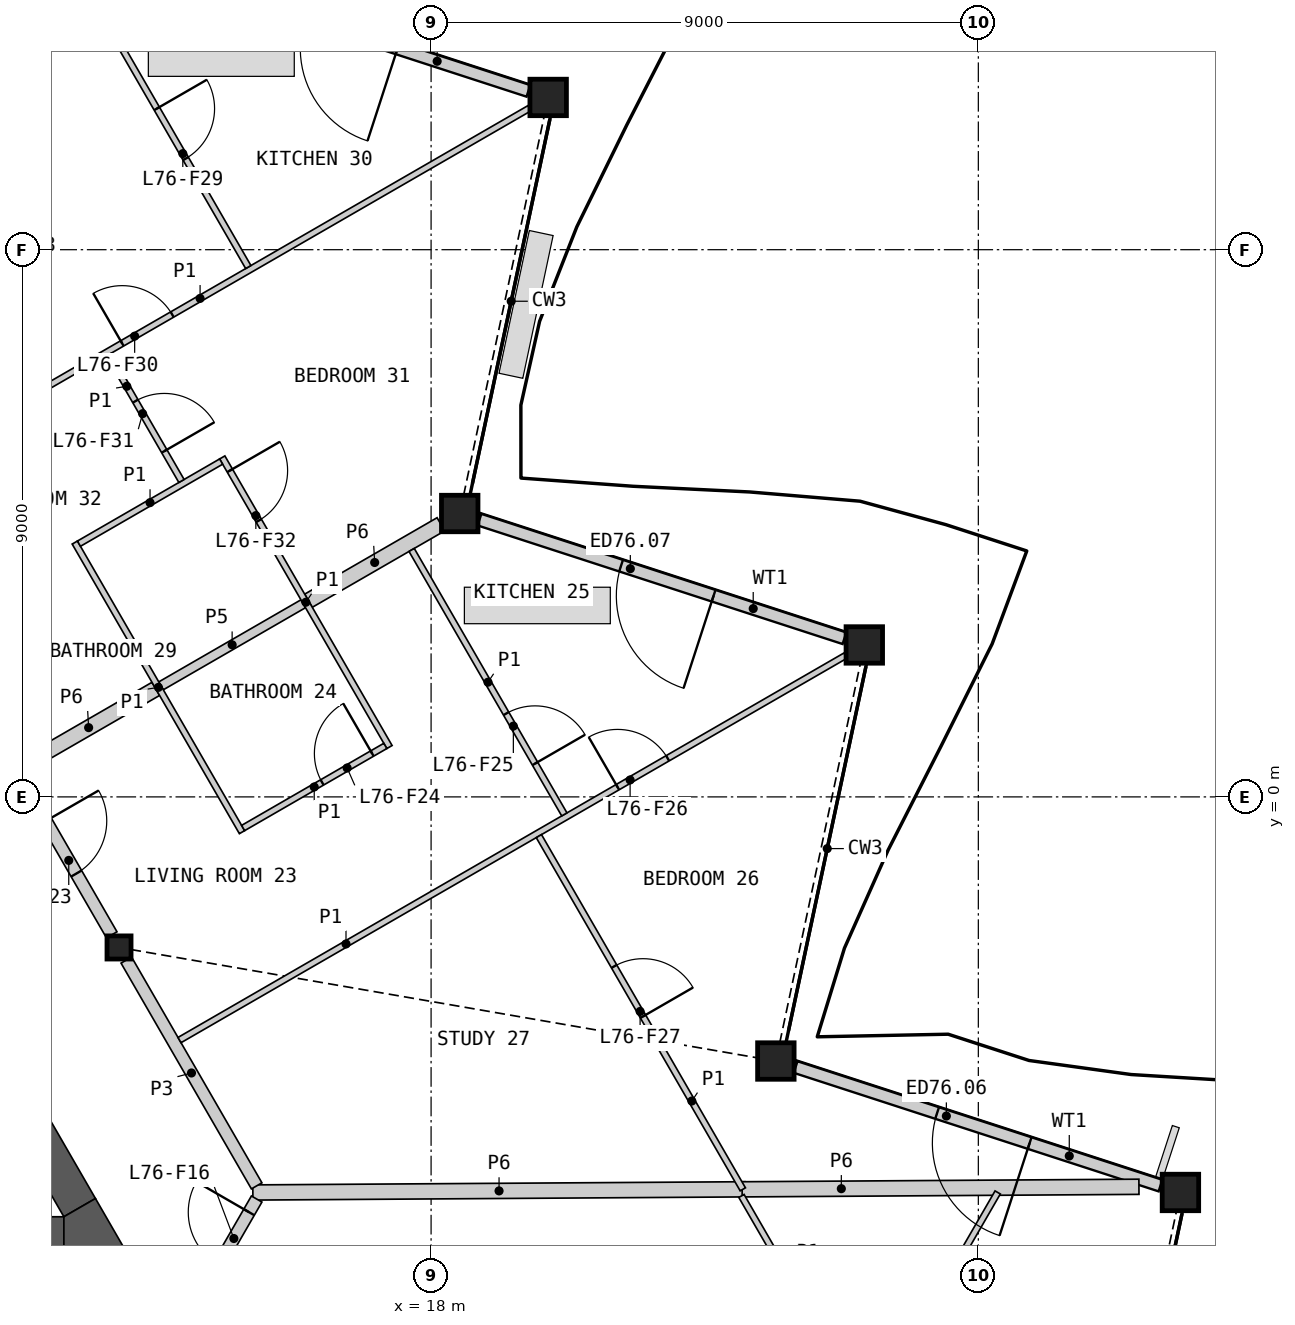
"""IFC4 building model, lengths in metres.
Left out: names, types, materials, properties, quantities, classifications, styles, units other than length and angle.
Written with IfcOpenShell. Run it as: python <this file> out.ifc"""

import sys

from ifc_helpers import new_model, si_unit, direction, frame, frame_2d, origin, origin_2d, place, context, subcontext, project, spatial, polyline, rectangle, hollow_rectangle, i_section, outline, extrude, element, fill, save


model = new_model("IFC4")
c1 = context("Model", 3, precision=1e-05, world=origin(), true_north=direction((0.0, 1.0)))
c2 = subcontext(c1, "Body", "Model", "MODEL_VIEW")
j1 = project(units=[si_unit("LENGTHUNIT", "METRE"), si_unit("PLANEANGLEUNIT", "RADIAN")], contexts=[c1])
p1 = place(None, origin())
s1 = spatial("IfcSite", under=j1, at=p1, CompositionType="ELEMENT")
p2 = place(p1, origin())
s2 = spatial("IfcBuilding", under=s1, at=p2, CompositionType="ELEMENT")
p3 = place(p2, frame((0.0, 0.0, 339.2)))
s3 = spatial("IfcBuildingStorey", under=s2, at=p3, CompositionType="ELEMENT", Elevation=339.2)
for number, where, z_axis, x_axis in (
    (1, (30.324, -6.506, 0.0), (0.0, 0.0, 1.0), (1.0, 0.0, 0.0)),
    (2, (23.67, -4.344, 0.0), (0.0, 0.0, 1.0), (1.0, 0.0, 0.0)),
    (3, (25.125, 2.499, 0.0), (0.0, 0.0, 1.0), (1.0, 0.0, 0.0)),
    (4, (18.471, 4.661, 0.0), (0.0, 0.0, 1.0), (1.0, 0.0, 0.0)),
    (5, (19.926, 11.504, 0.0), (0.0, 0.0, 1.0), (1.0, 0.0, 0.0)),
):
    element("IfcColumn", number, at=place(p3, frame(where, z_axis=z_axis, x_axis=x_axis)), inside=s3, PredefinedType="COLUMN", context=c2, shape_type="SweptSolid", body=[
        extrude(hollow_rectangle(XDim=0.6, YDim=0.6, WallThickness=0.04, at=origin_2d()), origin(), (0.0, 0.0, 1.0), 3.4),
    ])
p4 = place(p3, frame((12.868, -2.476, 0.0), z_axis=(0.0, 0.0, 1.0), x_axis=(1.0, 0.0, 0.0)))
e6 = element("IfcColumn", 6, at=p4, inside=s3, PredefinedType="COLUMN", context=c2, shape_type="SweptSolid", body=[
    extrude(i_section(OverallWidth=0.396, OverallDepth=0.381, WebThickness=0.019, FlangeThickness=0.03, at=origin_2d()), origin(), (0.0, 0.0, 1.0), 3.4),
])
p5 = place(p3, frame((29.996, -6.393, 0.0), z_axis=(0.0, 0.0, 1.0), x_axis=(-0.951051127664, 0.309033578383, 0.0)))
e7 = element("IfcWall", 7, at=p5, inside=s3, PredefinedType="SOLIDWALL", context=c2, shape_type="SweptSolid", body=[
    extrude(rectangle(XDim=6.31, YDim=0.2, at=frame_2d((3.155, 0.0))), origin(), (0.0, 0.0, 1.0), 2.488),
])
p6 = place(p5, frame((2.263, 0.0, 0.0)))
e8 = element("IfcOpeningElement", 8, at=p6, cuts=e7, PredefinedType="OPENING", context=c2, shape_type="SweptSolid", body=[
    extrude(rectangle(XDim=1.6, YDim=2.25, at=frame_2d((0.8, 1.125))), frame((0.0, 0.11, 0.0), z_axis=(0.0, -1.0, 0.0), x_axis=(1.0, 0.0, 0.0)), (0.0, 0.0, 1.0), 0.22),
])
p7 = place(p3, frame((24.798, 2.609, 0.0), z_axis=(0.0, 0.0, 1.0), x_axis=(-0.951065616977, 0.308988983952, 0.0)))
e9 = element("IfcWall", 9, at=p7, inside=s3, PredefinedType="SOLIDWALL", context=c2, shape_type="SweptSolid", body=[
    extrude(rectangle(XDim=6.312, YDim=0.2, at=frame_2d((3.156, 0.0))), origin(), (0.0, 0.0, 1.0), 2.488),
])
p8 = place(p7, frame((2.263, 0.0, 0.0)))
e10 = element("IfcOpeningElement", 10, at=p8, cuts=e9, PredefinedType="OPENING", context=c2, shape_type="SweptSolid", body=[
    extrude(rectangle(XDim=1.6, YDim=2.25, at=frame_2d((0.8, 1.125))), frame((0.0, 0.11, 0.0), z_axis=(0.0, -1.0, 0.0), x_axis=(1.0, 0.0, 0.0)), (0.0, 0.0, 1.0), 0.22),
])
p9 = place(p3, frame((19.601, 11.612, 0.0), z_axis=(0.0, 0.0, 1.0), x_axis=(-0.951065041052, 0.308990756638, 0.0)))
e11 = element("IfcWall", 11, at=p9, inside=s3, PredefinedType="SOLIDWALL", context=c2, shape_type="SweptSolid", body=[
    extrude(rectangle(XDim=6.313, YDim=0.2, at=frame_2d((3.156, 0.0))), origin(), (0.0, 0.0, 1.0), 2.488),
])
p10 = place(p9, frame((2.263, 0.0, 0.0)))
e12 = element("IfcOpeningElement", 12, at=p10, cuts=e11, PredefinedType="OPENING", context=c2, shape_type="SweptSolid", body=[
    extrude(rectangle(XDim=1.6, YDim=2.25, at=frame_2d((0.8, 1.125))), frame((0.0, 0.11, 0.0), z_axis=(0.0, -1.0, 0.0), x_axis=(1.0, 0.0, 0.0)), (0.0, 0.0, 1.0), 0.22),
])
p11 = place(p3, frame((-11.961, -7.206, 0.0), z_axis=(0.0, 0.0, 1.0), x_axis=(1.0, 0.0, 0.0)))
e13 = element("IfcWall", 13, at=p11, inside=s3, PredefinedType="SHEAR", context=c2, shape_type="SweptSolid", body=[
    extrude(rectangle(XDim=23.921, YDim=0.6, at=frame_2d((11.961, 0.0))), origin(), (0.0, 0.0, 1.0), 3.1),
])
p12 = place(p3, frame((12.221, -6.756, 0.0), z_axis=(0.0, 0.0, 1.0), x_axis=(-0.50000604952, 0.866021911064, 0.0)))
e14 = element("IfcWall", 14, at=p12, inside=s3, PredefinedType="SHEAR", context=c2, shape_type="SweptSolid", body=[
    extrude(rectangle(XDim=4.869, YDim=0.6, at=frame_2d((2.434, 0.0))), origin(), (0.0, 0.0, 1.0), 3.1),
])
p13 = place(p3, origin())
e15 = element("IfcWall", 15, at=p13, inside=s3, PredefinedType="SHEAR", context=c2, shape_type="SweptSolid", body=[
    extrude(outline(polyline([(11.961, -7.506), (11.961, -6.906), (12.48, -6.606), (13.0, -7.506), (11.961, -7.506)])), origin(), (0.0, 0.0, 1.0), 3.1),
])
p14 = place(p3, frame((8.698, 4.745, 0.0), z_axis=(0.0, 0.0, 1.0), x_axis=(0.499984266882, -0.866034487114, 0.0)))
e16 = element("IfcWall", 16, at=p14, inside=s3, PredefinedType="PARTITIONING", context=c2, shape_type="SweptSolid", body=[
    extrude(rectangle(XDim=8.099, YDim=0.2, at=frame_2d((4.049, 0.0))), origin(), (0.0, 0.0, 1.0), 3.1),
])
p15 = place(p14, frame((5.935, 0.0, 0.0)))
e17 = element("IfcOpeningElement", 17, at=p15, cuts=e16, PredefinedType="OPENING", context=c2, shape_type="SweptSolid", body=[
    extrude(rectangle(XDim=1.0, YDim=2.1, at=frame_2d((0.5, 1.05))), frame((0.0, 0.11, 0.0), z_axis=(0.0, -1.0, 0.0), x_axis=(1.0, 0.0, 0.0)), (0.0, 0.0, 1.0), 0.22),
])
p16 = place(p3, frame((6.066, 9.504, 0.0), z_axis=(0.0, 0.0, 1.0), x_axis=(0.866021168401, 0.500007335828, 0.0)))
e18 = element("IfcWall", 18, at=p16, inside=s3, PredefinedType="PARTITIONING", context=c2, shape_type="SweptSolid", body=[
    extrude(rectangle(XDim=7.962, YDim=0.25, at=frame_2d((3.981, 0.0))), origin(), (0.0, 0.0, 1.0), 2.33),
])
p17 = place(p3, frame((15.069, -6.506, 0.0), z_axis=(0.0, 0.0, 1.0), x_axis=(0.999979186485, 0.006451867641, 0.0)))
e19 = element("IfcWall", 19, at=p17, inside=s3, PredefinedType="PARTITIONING", context=c2, shape_type="SweptSolid", body=[
    extrude(rectangle(XDim=8.098, YDim=0.25, at=frame_2d((4.049, 0.0))), origin(), (0.0, 0.0, 1.0), 2.33),
])
p18 = place(p3, frame((23.115, -6.455, 0.0), z_axis=(0.0, 0.0, 1.0), x_axis=(0.999979299397, 0.006434343627, 0.0)))
e20 = element("IfcWall", 20, at=p18, inside=s3, PredefinedType="PARTITIONING", context=c2, shape_type="SweptSolid", body=[
    extrude(rectangle(XDim=6.526, YDim=0.25, at=frame_2d((3.263, 0.0))), origin(), (0.0, 0.0, 1.0), 2.33),
])
p19 = place(p3, frame((12.988, -2.684, 0.0), z_axis=(0.0, 0.0, 1.0), x_axis=(0.500003406062, -0.866023437285, 0.0)))
e21 = element("IfcWall", 21, at=p19, inside=s3, PredefinedType="PARTITIONING", context=c2, shape_type="SweptSolid", body=[
    extrude(rectangle(XDim=4.288, YDim=0.2, at=frame_2d((2.144, 0.0))), origin(), (0.0, 0.0, 1.0), 3.1),
])
p20 = place(p3, frame((13.293, -9.797, 0.0), z_axis=(0.0, 0.0, 1.0), x_axis=(0.499967746641, 0.866044024469, 0.0)))
e22 = element("IfcWall", 22, at=p20, inside=s3, PredefinedType="PARTITIONING", context=c2, shape_type="SweptSolid", body=[
    extrude(rectangle(XDim=3.676, YDim=0.2, at=frame_2d((1.838, 0.0))), origin(), (0.0, 0.0, 1.0), 3.1),
])
p21 = place(p20, frame((2.426, 0.0, 0.0)))
e23 = element("IfcOpeningElement", 23, at=p21, cuts=e22, PredefinedType="OPENING", context=c2, shape_type="SweptSolid", body=[
    extrude(rectangle(XDim=1.0, YDim=2.1, at=frame_2d((0.5, 1.05))), frame((0.0, 0.11, 0.0), z_axis=(0.0, -1.0, 0.0), x_axis=(1.0, 0.0, 0.0)), (0.0, 0.0, 1.0), 0.22),
])
p22 = place(p3, frame((11.264, 0.502, 0.0), z_axis=(0.0, 0.0, 1.0), x_axis=(0.866030925526, 0.499990435942, 0.0)))
e24 = element("IfcWall", 24, at=p22, inside=s3, PredefinedType="PARTITIONING", context=c2, shape_type="SweptSolid", body=[
    extrude(rectangle(XDim=2.55, YDim=0.25, at=frame_2d((1.275, 0.0))), origin(), (0.0, 0.0, 1.0), 2.33),
])
p23 = place(p3, frame((15.984, 3.227, 0.0), z_axis=(0.0, 0.0, 1.0), x_axis=(0.8660174017, 0.500013859761, 0.0)))
e25 = element("IfcWall", 25, at=p23, inside=s3, PredefinedType="PARTITIONING", context=c2, shape_type="SweptSolid", body=[
    extrude(rectangle(XDim=2.514, YDim=0.25, at=frame_2d((1.257, 0.0))), origin(), (0.0, 0.0, 1.0), 2.33),
])
p24 = place(p3, frame((13.559, 1.827, 0.0), z_axis=(0.0, 0.0, 1.0), x_axis=(0.866059108428, 0.4999416173, 0.0)))
e26 = element("IfcWall", 26, at=p24, inside=s3, PredefinedType="PLUMBINGWALL", context=c2, shape_type="SweptSolid", body=[
    extrude(rectangle(XDim=2.7, YDim=0.15, at=frame_2d((1.35, 0.0))), origin(), (0.0, 0.0, 1.0), 2.33),
])
p25 = place(p3, frame((13.863, -4.0, 0.0), z_axis=(0.0, 0.0, 1.0), x_axis=(0.866033203648, 0.499986489997, 0.0)))
e27 = element("IfcWall", 27, at=p25, inside=s3, PredefinedType="PARTITIONING", context=c2, shape_type="SweptSolid", body=[
    extrude(rectangle(XDim=12.646, YDim=0.1, at=frame_2d((6.323, 0.0))), origin(), (0.0, 0.0, 1.0), 2.33),
])
p26 = place(p25, frame((8.319, 0.0, 0.0)))
e28 = element("IfcOpeningElement", 28, at=p26, cuts=e27, PredefinedType="OPENING", context=c2, shape_type="SweptSolid", body=[
    extrude(rectangle(XDim=0.95, YDim=2.1, at=frame_2d((0.475, 1.05))), frame((0.0, 0.06, 0.0), z_axis=(0.0, -1.0, 0.0), x_axis=(1.0, 0.0, 0.0)), (0.0, 0.0, 1.0), 0.12),
])
p27 = place(p3, frame((8.786, 5.073, 0.0), z_axis=(0.0, 0.0, 1.0), x_axis=(0.86602139559, 0.500006942333, 0.0)))
e29 = element("IfcWall", 29, at=p27, inside=s3, PredefinedType="PARTITIONING", context=c2, shape_type="SweptSolid", body=[
    extrude(rectangle(XDim=12.505, YDim=0.1, at=frame_2d((6.252, 0.0))), origin(), (0.0, 0.0, 1.0), 2.33),
])
p28 = place(p27, frame((4.772, 0.0, 0.0)))
e30 = element("IfcOpeningElement", 30, at=p28, cuts=e29, PredefinedType="OPENING", context=c2, shape_type="SweptSolid", body=[
    extrude(rectangle(XDim=0.95, YDim=2.1, at=frame_2d((0.475, 1.05))), frame((0.0, 0.06, 0.0), z_axis=(0.0, -1.0, 0.0), x_axis=(1.0, 0.0, 0.0)), (0.0, 0.0, 1.0), 0.12),
])
p29 = place(p3, frame((9.846, 17.63, 0.0), z_axis=(0.0, 0.0, 1.0), x_axis=(0.500013259472, -0.866017748289, 0.0)))
e31 = element("IfcWall", 31, at=p29, inside=s3, PredefinedType="PARTITIONING", context=c2, shape_type="SweptSolid", body=[
    extrude(rectangle(XDim=10.295, YDim=0.1, at=frame_2d((5.147, 0.0))), origin(), (0.0, 0.0, 1.0), 2.33),
])
p30 = place(p29, frame((7.286, 0.0, 0.0)))
e32 = element("IfcOpeningElement", 32, at=p30, cuts=e31, PredefinedType="OPENING", context=c2, shape_type="SweptSolid", body=[
    extrude(rectangle(XDim=0.95, YDim=2.1, at=frame_2d((0.475, 1.05))), frame((0.0, 0.06, 0.0), z_axis=(0.0, -1.0, 0.0), x_axis=(1.0, 0.0, 0.0)), (0.0, 0.0, 1.0), 0.12),
])
p31 = place(p29, frame((0.954, 0.0, 0.0)))
e33 = element("IfcOpeningElement", 33, at=p31, cuts=e31, PredefinedType="OPENING", context=c2, shape_type="SweptSolid", body=[
    extrude(rectangle(XDim=0.95, YDim=2.1, at=frame_2d((0.475, 1.05))), frame((0.0, 0.06, 0.0), z_axis=(0.0, -1.0, 0.0), x_axis=(1.0, 0.0, 0.0)), (0.0, 0.0, 1.0), 0.12),
])
p32 = place(p3, frame((23.331, -13.412, 0.0), z_axis=(0.0, 0.0, 1.0), x_axis=(0.499994510044, 0.866028573389, 0.0)))
e34 = element("IfcWall", 34, at=p32, inside=s3, PredefinedType="PARTITIONING", context=c2, shape_type="SweptSolid", body=[
    extrude(rectangle(XDim=7.975, YDim=0.1, at=frame_2d((3.988, 0.0))), origin(), (0.0, 0.0, 1.0), 2.33),
])
p33 = place(p32, frame((1.957, 0.0, 0.0)))
e35 = element("IfcOpeningElement", 35, at=p33, cuts=e34, PredefinedType="OPENING", context=c2, shape_type="SweptSolid", body=[
    extrude(rectangle(XDim=0.95, YDim=2.1, at=frame_2d((0.475, 1.05))), frame((0.0, 0.06, 0.0), z_axis=(0.0, -1.0, 0.0), x_axis=(1.0, 0.0, 0.0)), (0.0, 0.0, 1.0), 0.12),
])
p34 = place(p3, frame((19.773, -0.645, 0.0), z_axis=(0.0, 0.0, 1.0), x_axis=(0.499998644583, -0.866026186333, 0.0)))
e36 = element("IfcWall", 36, at=p34, inside=s3, PredefinedType="PARTITIONING", context=c2, shape_type="SweptSolid", body=[
    extrude(rectangle(XDim=6.708, YDim=0.1, at=frame_2d((3.354, 0.0))), origin(), (0.0, 0.0, 1.0), 2.33),
])
p35 = place(p34, frame((2.475, 0.0, 0.0)))
e37 = element("IfcOpeningElement", 37, at=p35, cuts=e36, PredefinedType="OPENING", context=c2, shape_type="SweptSolid", body=[
    extrude(rectangle(XDim=0.95, YDim=2.1, at=frame_2d((0.475, 1.05))), frame((0.0, 0.06, 0.0), z_axis=(0.0, -1.0, 0.0), x_axis=(1.0, 0.0, 0.0)), (0.0, 0.0, 1.0), 0.12),
])
p36 = place(p3, frame((14.565, 5.583, 0.0), z_axis=(0.0, 0.0, 1.0), x_axis=(0.499996545922, -0.866027397988, 0.0)))
e38 = element("IfcWall", 38, at=p36, inside=s3, PredefinedType="PARTITIONING", context=c2, shape_type="SweptSolid", body=[
    extrude(rectangle(XDim=5.5, YDim=0.1, at=frame_2d((2.75, 0.0))), origin(), (0.0, 0.0, 1.0), 2.33),
])
p37 = place(p36, frame((0.25, 0.0, 0.0)))
e39 = element("IfcOpeningElement", 39, at=p37, cuts=e38, PredefinedType="OPENING", context=c2, shape_type="SweptSolid", body=[
    extrude(rectangle(XDim=0.95, YDim=2.1, at=frame_2d((0.475, 1.05))), frame((0.0, 0.06, 0.0), z_axis=(0.0, -1.0, 0.0), x_axis=(1.0, 0.0, 0.0)), (0.0, 0.0, 1.0), 0.12),
])
p38 = place(p3, frame((12.14, 4.183, 0.0), z_axis=(0.0, 0.0, 1.0), x_axis=(0.499996545922, -0.866027397988, 0.0)))
e40 = element("IfcWall", 40, at=p38, inside=s3, PredefinedType="PARTITIONING", context=c2, shape_type="SweptSolid", body=[
    extrude(rectangle(XDim=5.5, YDim=0.1, at=frame_2d((2.75, 0.0))), origin(), (0.0, 0.0, 1.0), 2.33),
])
p39 = place(p3, frame((17.68, 4.062, 0.0), z_axis=(0.0, 0.0, 1.0), x_axis=(0.499997360652, -0.866026927608, 0.0)))
e41 = element("IfcWall", 41, at=p39, inside=s3, PredefinedType="PARTITIONING", context=c2, shape_type="SweptSolid", body=[
    extrude(rectangle(XDim=5.022, YDim=0.1, at=frame_2d((2.511, 0.0))), origin(), (0.0, 0.0, 1.0), 2.33),
])
p40 = place(p39, frame((3.108, 0.0, 0.0)))
e42 = element("IfcOpeningElement", 42, at=p40, cuts=e41, PredefinedType="OPENING", context=c2, shape_type="SweptSolid", body=[
    extrude(rectangle(XDim=0.95, YDim=2.1, at=frame_2d((0.475, 1.05))), frame((0.0, 0.06, 0.0), z_axis=(0.0, -1.0, 0.0), x_axis=(1.0, 0.0, 0.0)), (0.0, 0.0, 1.0), 0.12),
])
p41 = place(p3, frame((23.104, -6.563, 0.0), z_axis=(0.0, 0.0, 1.0), x_axis=(0.499999078476, -0.866025935826, 0.0)))
e43 = element("IfcWall", 43, at=p41, inside=s3, PredefinedType="PARTITIONING", context=c2, shape_type="SweptSolid", body=[
    extrude(rectangle(XDim=2.979, YDim=0.1, at=frame_2d((1.49, 0.0))), origin(), (0.0, 0.0, 1.0), 2.33),
])
p42 = place(p3, frame((14.909, -0.512, 0.0), z_axis=(0.0, 0.0, 1.0), x_axis=(0.866019956843, 0.50000943426, 0.0)))
e44 = element("IfcWall", 44, at=p42, inside=s3, PredefinedType="PARTITIONING", context=c2, shape_type="SweptSolid", body=[
    extrude(rectangle(XDim=2.7, YDim=0.1, at=frame_2d((1.35, 0.0))), origin(), (0.0, 0.0, 1.0), 2.33),
])
p43 = place(p42, frame((1.5, 0.0, 0.0)))
e45 = element("IfcOpeningElement", 45, at=p43, cuts=e44, PredefinedType="OPENING", context=c2, shape_type="SweptSolid", body=[
    extrude(rectangle(XDim=0.95, YDim=2.1, at=frame_2d((0.475, 1.05))), frame((0.0, 0.06, 0.0), z_axis=(0.0, -1.0, 0.0), x_axis=(1.0, 0.0, 0.0)), (0.0, 0.0, 1.0), 0.12),
])
p44 = place(p3, frame((12.209, 4.165, 0.0), z_axis=(0.0, 0.0, 1.0), x_axis=(0.866019956843, 0.50000943426, 0.0)))
e46 = element("IfcWall", 46, at=p44, inside=s3, PredefinedType="PARTITIONING", context=c2, shape_type="SweptSolid", body=[
    extrude(rectangle(XDim=2.7, YDim=0.1, at=frame_2d((1.35, 0.0))), origin(), (0.0, 0.0, 1.0), 2.33),
])
p45 = place(p3, frame((12.696, 7.272, 0.0), z_axis=(0.0, 0.0, 1.0), x_axis=(0.500016292001, -0.866015997389, 0.0)))
e47 = element("IfcWall", 47, at=p45, inside=s3, PredefinedType="PARTITIONING", context=c2, shape_type="SweptSolid", body=[
    extrude(rectangle(XDim=2.397, YDim=0.1, at=frame_2d((1.199, 0.0))), origin(), (0.0, 0.0, 1.0), 2.33),
])
p46 = place(p45, frame((0.882, 0.0, 0.0)))
e48 = element("IfcOpeningElement", 48, at=p46, cuts=e47, PredefinedType="OPENING", context=c2, shape_type="SweptSolid", body=[
    extrude(rectangle(XDim=0.95, YDim=2.1, at=frame_2d((0.475, 1.05))), frame((0.0, 0.06, 0.0), z_axis=(0.0, -1.0, 0.0), x_axis=(1.0, 0.0, 0.0)), (0.0, 0.0, 1.0), 0.12),
])
p47 = place(p6, origin())
e49 = element("IfcDoor", 49, at=p47, inside=s3, OperationType="DOUBLE_DOOR_SINGLE_SWING", PredefinedType="DOOR", context=c2, shape_type="SweptSolid", body=[
    extrude(rectangle(XDim=1.6, YDim=2.25, at=frame_2d((0.8, 1.125))), frame((0.0, 0.025, 0.0), z_axis=(0.0, -1.0, 0.0), x_axis=(1.0, 0.0, 0.0)), (0.0, 0.0, 1.0), 0.05),
])
fill(e8, e49)
p48 = place(p8, origin())
e50 = element("IfcDoor", 50, at=p48, inside=s3, OperationType="DOUBLE_DOOR_SINGLE_SWING", PredefinedType="DOOR", context=c2, shape_type="SweptSolid", body=[
    extrude(rectangle(XDim=1.6, YDim=2.25, at=frame_2d((0.8, 1.125))), frame((0.0, 0.025, 0.0), z_axis=(0.0, -1.0, 0.0), x_axis=(1.0, 0.0, 0.0)), (0.0, 0.0, 1.0), 0.05),
])
fill(e10, e50)
p49 = place(p21, origin())
e51 = element("IfcDoor", 51, at=p49, inside=s3, OperationType="SINGLE_SWING_RIGHT", PredefinedType="DOOR", context=c2, shape_type="SweptSolid", body=[
    extrude(rectangle(XDim=1.0, YDim=2.1, at=frame_2d((0.5, 1.05))), frame((0.0, 0.025, 0.0), z_axis=(0.0, -1.0, 0.0), x_axis=(1.0, 0.0, 0.0)), (0.0, 0.0, 1.0), 0.05),
])
fill(e23, e51)
p50 = place(p15, origin())
e52 = element("IfcDoor", 52, at=p50, inside=s3, OperationType="SINGLE_SWING_LEFT", PredefinedType="DOOR", context=c2, shape_type="SweptSolid", body=[
    extrude(rectangle(XDim=1.0, YDim=2.1, at=frame_2d((0.5, 1.05))), frame((0.0, 0.025, 0.0), z_axis=(0.0, -1.0, 0.0), x_axis=(1.0, 0.0, 0.0)), (0.0, 0.0, 1.0), 0.05),
])
fill(e17, e52)
p51 = place(p43, origin())
e53 = element("IfcDoor", 53, at=p51, inside=s3, OperationType="SINGLE_SWING_RIGHT", PredefinedType="DOOR", context=c2, shape_type="SweptSolid", body=[
    extrude(rectangle(XDim=0.95, YDim=2.1, at=frame_2d((0.475, 1.05))), frame((0.0, 0.025, 0.0), z_axis=(0.0, -1.0, 0.0), x_axis=(1.0, 0.0, 0.0)), (0.0, 0.0, 1.0), 0.05),
])
fill(e45, e53)
p52 = place(p40, origin())
e54 = element("IfcDoor", 54, at=p52, inside=s3, OperationType="SINGLE_SWING_RIGHT", PredefinedType="DOOR", context=c2, shape_type="SweptSolid", body=[
    extrude(rectangle(XDim=0.95, YDim=2.1, at=frame_2d((0.475, 1.05))), frame((0.0, 0.025, 0.0), z_axis=(0.0, -1.0, 0.0), x_axis=(1.0, 0.0, 0.0)), (0.0, 0.0, 1.0), 0.05),
])
fill(e42, e54)
p53 = place(p26, origin())
e55 = element("IfcDoor", 55, at=p53, inside=s3, OperationType="SINGLE_SWING_LEFT", PredefinedType="DOOR", context=c2, shape_type="SweptSolid", body=[
    extrude(rectangle(XDim=0.95, YDim=2.1, at=frame_2d((0.475, 1.05))), frame((0.0, 0.025, 0.0), z_axis=(0.0, -1.0, 0.0), x_axis=(1.0, 0.0, 0.0)), (0.0, 0.0, 1.0), 0.05),
])
fill(e28, e55)
p54 = place(p35, origin())
e56 = element("IfcDoor", 56, at=p54, inside=s3, OperationType="SINGLE_SWING_RIGHT", PredefinedType="DOOR", context=c2, shape_type="SweptSolid", body=[
    extrude(rectangle(XDim=0.95, YDim=2.1, at=frame_2d((0.475, 1.05))), frame((0.0, 0.025, 0.0), z_axis=(0.0, -1.0, 0.0), x_axis=(1.0, 0.0, 0.0)), (0.0, 0.0, 1.0), 0.05),
])
fill(e37, e56)
p55 = place(p30, origin())
e57 = element("IfcDoor", 57, at=p55, inside=s3, OperationType="SINGLE_SWING_LEFT", PredefinedType="DOOR", context=c2, shape_type="SweptSolid", body=[
    extrude(rectangle(XDim=0.95, YDim=2.1, at=frame_2d((0.475, 1.05))), frame((0.0, 0.025, 0.0), z_axis=(0.0, -1.0, 0.0), x_axis=(1.0, 0.0, 0.0)), (0.0, 0.0, 1.0), 0.05),
])
fill(e32, e57)
p56 = place(p28, origin())
e58 = element("IfcDoor", 58, at=p56, inside=s3, OperationType="SINGLE_SWING_LEFT", PredefinedType="DOOR", context=c2, shape_type="SweptSolid", body=[
    extrude(rectangle(XDim=0.95, YDim=2.1, at=frame_2d((0.475, 1.05))), frame((0.0, 0.025, 0.0), z_axis=(0.0, -1.0, 0.0), x_axis=(1.0, 0.0, 0.0)), (0.0, 0.0, 1.0), 0.05),
])
fill(e30, e58)
p57 = place(p46, origin())
e59 = element("IfcDoor", 59, at=p57, inside=s3, OperationType="SINGLE_SWING_RIGHT", PredefinedType="DOOR", context=c2, shape_type="SweptSolid", body=[
    extrude(rectangle(XDim=0.95, YDim=2.1, at=frame_2d((0.475, 1.05))), frame((0.0, 0.025, 0.0), z_axis=(0.0, -1.0, 0.0), x_axis=(1.0, 0.0, 0.0)), (0.0, 0.0, 1.0), 0.05),
])
fill(e48, e59)
p58 = place(p37, origin())
e60 = element("IfcDoor", 60, at=p58, inside=s3, OperationType="SINGLE_SWING_LEFT", PredefinedType="DOOR", context=c2, shape_type="SweptSolid", body=[
    extrude(rectangle(XDim=0.95, YDim=2.1, at=frame_2d((0.475, 1.05))), frame((0.0, 0.025, 0.0), z_axis=(0.0, -1.0, 0.0), x_axis=(1.0, 0.0, 0.0)), (0.0, 0.0, 1.0), 0.05),
])
fill(e39, e60)
save(model, sys.argv[1])
